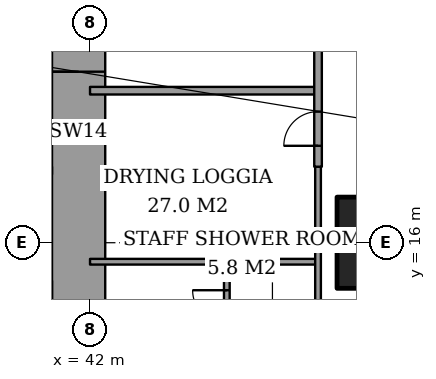
"""IFC4 building model, lengths in metres.
Left out: names, types, materials, properties, quantities, classifications, styles, units other than length and angle.
Written with IfcOpenShell. Run it as: python <this file> out.ifc"""

import sys

from ifc_helpers import new_model, si_unit, direction, frame, frame_2d, origin, origin_2d, place, context, subcontext, project, spatial, rectangle, extrude, element, fill, save


model = new_model("IFC4")
c1 = context("Model", 3, precision=1e-05, world=origin(), true_north=direction((0.0, 1.0)))
c2 = subcontext(c1, "Body", "Model", "MODEL_VIEW")
j1 = project(units=[si_unit("LENGTHUNIT", "METRE"), si_unit("PLANEANGLEUNIT", "RADIAN")], contexts=[c1])
p1 = place(None, origin())
s1 = spatial("IfcSite", under=j1, at=p1, CompositionType="ELEMENT")
p2 = place(p1, origin())
s2 = spatial("IfcBuilding", under=s1, at=p2, CompositionType="ELEMENT")
p3 = place(p2, frame((0.0, 0.0, 185.8)))
s3 = spatial("IfcBuildingStorey", under=s2, at=p3, CompositionType="ELEMENT", Elevation=185.8)
p4 = place(p3, frame((50.0, 16.0, 0.0), z_axis=(0.0, 0.0, 1.0), x_axis=(1.0, 0.0, 0.0)))
e1 = element("IfcColumn", 1, at=p4, inside=s3, PredefinedType="COLUMN", context=c2, shape_type="SweptSolid", body=[
    extrude(rectangle(XDim=3.0, YDim=2.4, at=origin_2d()), origin(), (0.0, 0.0, 1.0), 3.6),
])
p5 = place(p3, frame((41.7, 13.0, 0.0), z_axis=(0.0, 0.0, 1.0), x_axis=(0.0, 1.0, 0.0)))
e2 = element("IfcWall", 2, at=p5, inside=s3, PredefinedType="SHEAR", context=c2, shape_type="SweptSolid", body=[
    extrude(rectangle(XDim=11.85, YDim=1.4, at=frame_2d((5.925, 0.0))), origin(), (0.0, 0.0, 1.0), 3.6),
])
p6 = place(p5, frame((7.5, 0.0, 0.0)))
e3 = element("IfcOpeningElement", 3, at=p6, cuts=e2, PredefinedType="OPENING", context=c2, shape_type="SweptSolid", body=[
    extrude(rectangle(XDim=1.8, YDim=2.4, at=frame_2d((0.9, 1.2))), frame((0.0, 0.71, 0.0), z_axis=(0.0, -1.0, 0.0), x_axis=(1.0, 0.0, 0.0)), (0.0, 0.0, 1.0), 1.42),
])
p7 = place(p3, frame((42.0, 15.5, 0.0), z_axis=(0.0, 0.0, 1.0), x_axis=(1.0, 0.0, 0.0)))
e4 = element("IfcWall", 4, at=p7, inside=s3, PredefinedType="PARTITIONING", context=c2, shape_type="SweptSolid", body=[
    extrude(rectangle(XDim=6.0, YDim=0.15, at=frame_2d((3.0, 0.0))), origin(), (0.0, 0.0, 1.0), 3.35),
])
p8 = place(p3, frame((48.0, 16.05, 0.0), z_axis=(0.0, 0.0, 1.0), x_axis=(1.0, 0.0, 0.0)))
e5 = element("IfcWall", 5, at=p8, inside=s3, PredefinedType="PARTITIONING", context=c2, shape_type="SweptSolid", body=[
    extrude(rectangle(XDim=0.5, YDim=0.15, at=frame_2d((0.25, 0.0))), origin(), (0.0, 0.0, 1.0), 2.634),
])
p9 = place(p3, frame((42.0, 20.0, 0.0), z_axis=(0.0, 0.0, 1.0), x_axis=(1.0, 0.0, 0.0)))
e6 = element("IfcWall", 6, at=p9, inside=s3, PredefinedType="PARTITIONING", context=c2, shape_type="SweptSolid", body=[
    extrude(rectangle(XDim=6.0, YDim=0.2, at=frame_2d((3.0, 0.0))), origin(), (0.0, 0.0, 1.0), 3.35),
])
p10 = place(p3, frame((45.6, 13.1, 0.0), z_axis=(0.0, 0.0, 1.0), x_axis=(0.0, 1.0, 0.0)))
e7 = element("IfcWall", 7, at=p10, inside=s3, PredefinedType="PARTITIONING", context=c2, shape_type="SweptSolid", body=[
    extrude(rectangle(XDim=2.4, YDim=0.15, at=frame_2d((1.2, 0.0))), origin(), (0.0, 0.0, 1.0), 3.35),
])
p11 = place(p10, frame((0.75, 0.0, 0.0)))
e8 = element("IfcOpeningElement", 8, at=p11, cuts=e7, PredefinedType="OPENING", context=c2, shape_type="SweptSolid", body=[
    extrude(rectangle(XDim=0.9, YDim=2.1, at=frame_2d((0.45, 1.05))), frame((0.0, 0.085, 0.0), z_axis=(0.0, -1.0, 0.0), x_axis=(1.0, 0.0, 0.0)), (0.0, 0.0, 1.0), 0.17),
])
p12 = place(p3, frame((48.0, 18.0, 0.0), z_axis=(0.0, 0.0, 1.0), x_axis=(0.0, 1.0, 0.0)))
e9 = element("IfcWall", 9, at=p12, inside=s3, PredefinedType="PARTITIONING", context=c2, shape_type="SweptSolid", body=[
    extrude(rectangle(XDim=6.0, YDim=0.2, at=frame_2d((3.0, 0.0))), origin(), (0.0, 0.0, 1.0), 3.35),
])
p13 = place(p12, frame((3.4, 0.0, 0.0)))
e10 = element("IfcOpeningElement", 10, at=p13, cuts=e9, PredefinedType="OPENING", context=c2, shape_type="SweptSolid", body=[
    extrude(rectangle(XDim=1.2, YDim=2.4, at=frame_2d((0.6, 1.2))), frame((0.0, 0.11, 0.0), z_axis=(0.0, -1.0, 0.0), x_axis=(1.0, 0.0, 0.0)), (0.0, 0.0, 1.0), 0.22),
])
p14 = place(p12, frame((0.55, 0.0, 0.0)))
e11 = element("IfcOpeningElement", 11, at=p14, cuts=e9, PredefinedType="OPENING", context=c2, shape_type="SweptSolid", body=[
    extrude(rectangle(XDim=0.9, YDim=2.1, at=frame_2d((0.45, 1.05))), frame((0.0, 0.11, 0.0), z_axis=(0.0, -1.0, 0.0), x_axis=(1.0, 0.0, 0.0)), (0.0, 0.0, 1.0), 0.22),
])
p15 = place(p3, frame((48.0, 11.2, 0.0), z_axis=(0.0, 0.0, 1.0), x_axis=(0.0, 1.0, 0.0)))
e12 = element("IfcWall", 12, at=p15, inside=s3, PredefinedType="PARTITIONING", context=c2, shape_type="SweptSolid", body=[
    extrude(rectangle(XDim=6.8, YDim=0.15, at=frame_2d((3.4, 0.0))), origin(), (0.0, 0.0, 1.0), 3.35),
])
p16 = place(p3, frame((28.3, 17.9, 0.0), z_axis=(0.0, 0.0, 1.0), x_axis=(1.0, 0.0, 0.0)))
e13 = element("IfcWall", 13, at=p16, inside=s3, PredefinedType="PARTITIONING", context=c2, shape_type="SweptSolid", body=[
    extrude(rectangle(XDim=12.7, YDim=0.2, at=frame_2d((6.35, 0.0))), origin(), (0.0, 0.0, 1.0), 3.6),
])
p17 = place(p16, frame((1.05, 0.0, 0.0)))
e14 = element("IfcOpeningElement", 14, at=p17, cuts=e13, PredefinedType="OPENING", context=c2, shape_type="SweptSolid", body=[
    extrude(rectangle(XDim=0.9, YDim=2.1, at=frame_2d((0.45, 1.05))), frame((0.0, 0.11, 0.0), z_axis=(0.0, -1.0, 0.0), x_axis=(1.0, 0.0, 0.0)), (0.0, 0.0, 1.0), 0.22),
])
p18 = place(p16, frame((4.2, 0.0, 0.0)))
e15 = element("IfcOpeningElement", 15, at=p18, cuts=e13, PredefinedType="OPENING", context=c2, shape_type="SweptSolid", body=[
    extrude(rectangle(XDim=1.0, YDim=2.1, at=frame_2d((0.5, 1.05))), frame((0.0, 0.11, 0.0), z_axis=(0.0, -1.0, 0.0), x_axis=(1.0, 0.0, 0.0)), (0.0, 0.0, 1.0), 0.22),
])
p19 = place(p16, frame((10.6, 0.0, 0.0)))
e16 = element("IfcOpeningElement", 16, at=p19, cuts=e13, PredefinedType="OPENING", context=c2, shape_type="SweptSolid", body=[
    extrude(rectangle(XDim=1.2, YDim=2.1, at=frame_2d((0.6, 1.05))), frame((0.0, 0.11, 0.0), z_axis=(0.0, -1.0, 0.0), x_axis=(1.0, 0.0, 0.0)), (0.0, 0.0, 1.0), 0.22),
])
p20 = place(p11, origin())
e17 = element("IfcDoor", 17, at=p20, inside=s3, OperationType="SINGLE_SWING_LEFT", PredefinedType="DOOR", context=c2, shape_type="SweptSolid", body=[
    extrude(rectangle(XDim=0.9, YDim=2.1, at=frame_2d((0.45, 1.05))), frame((0.0, 0.025, 0.0), z_axis=(0.0, -1.0, 0.0), x_axis=(1.0, 0.0, 0.0)), (0.0, 0.0, 1.0), 0.05),
])
fill(e8, e17)
p21 = place(p14, origin())
e18 = element("IfcDoor", 18, at=p21, inside=s3, OperationType="SINGLE_SWING_RIGHT", PredefinedType="DOOR", context=c2, shape_type="SweptSolid", body=[
    extrude(rectangle(XDim=0.9, YDim=2.1, at=frame_2d((0.45, 1.05))), frame((0.0, 0.025, 0.0), z_axis=(0.0, -1.0, 0.0), x_axis=(1.0, 0.0, 0.0)), (0.0, 0.0, 1.0), 0.05),
])
fill(e11, e18)
p22 = place(p6, origin())
e19 = element("IfcDoor", 19, at=p22, inside=s3, OperationType="DOUBLE_DOOR_DOUBLE_SWING", PredefinedType="DOOR", context=c2, shape_type="SweptSolid", body=[
    extrude(rectangle(XDim=1.8, YDim=2.4, at=frame_2d((0.9, 1.2))), frame((0.0, 0.025, 0.0), z_axis=(0.0, -1.0, 0.0), x_axis=(1.0, 0.0, 0.0)), (0.0, 0.0, 1.0), 0.05),
])
fill(e3, e19)
save(model, sys.argv[1])
